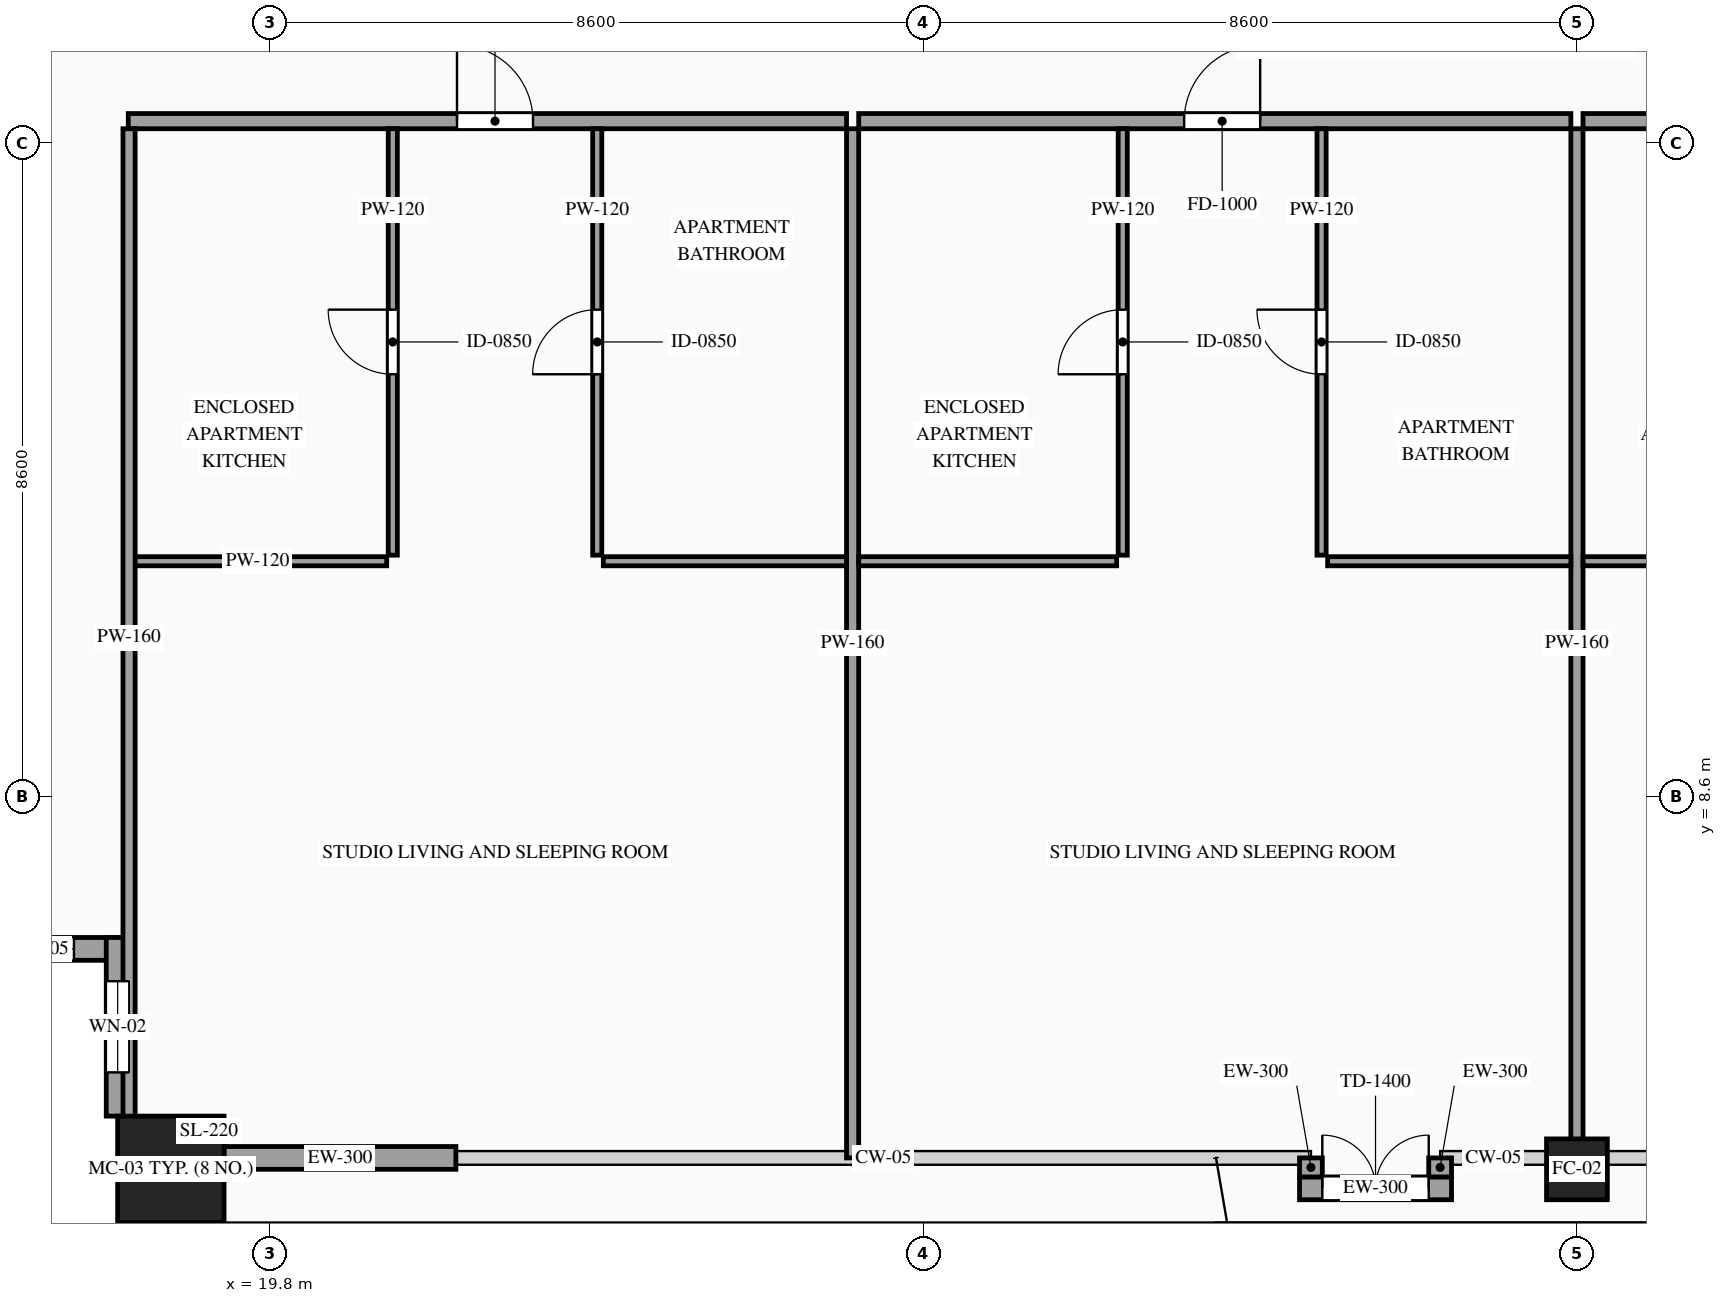
"""IFC4 building model, lengths in metres.
Left out: names, types, materials, properties, quantities, classifications, styles, units other than length and angle.
Written with IfcOpenShell. Run it as: python <this file> out.ifc"""

import sys

from ifc_helpers import new_model, si_unit, direction, frame, frame_2d, origin, origin_2d, place, context, subcontext, project, spatial, rectangle, hollow_rectangle, extrude, source, transform, mapped, element, fill, save


model = new_model("IFC4")
c1 = context("Model", 3, precision=1e-05, world=origin(), true_north=direction((0.0, 1.0)))
c2 = subcontext(c1, "Body", "Model", "MODEL_VIEW")
j1 = project(units=[si_unit("LENGTHUNIT", "METRE"), si_unit("PLANEANGLEUNIT", "RADIAN")], contexts=[c1])
p1 = place(None, origin())
s1 = spatial("IfcSite", under=j1, at=p1, CompositionType="ELEMENT")
p2 = place(p1, origin())
s2 = spatial("IfcBuilding", under=s1, at=p2, CompositionType="ELEMENT")
p3 = place(p2, frame((0.0, 0.0, 184.5)))
s3 = spatial("IfcBuildingStorey", under=s2, at=p3, CompositionType="ELEMENT", Elevation=184.5)
m1 = source(origin(), c2, "Body", "SweptSolid", [
    extrude(hollow_rectangle(XDim=1.4, YDim=1.4, WallThickness=0.06, at=origin_2d()), origin(), (0.0, 0.0, 1.0), 3.5),
])
p4 = place(p3, frame((18.5, 3.7, 0.0), z_axis=(0.0, 0.0, 1.0), x_axis=(1.0, 0.0, 0.0)))
e1 = element("IfcColumn", 1, at=p4, inside=s3, PredefinedType="COLUMN", context=c2, shape_type="MappedRepresentation", body=[
    mapped(m1, transform((0.0, 0.0, 0.0), scale=1.0)),
])
m2 = source(origin(), c2, "Body", "SweptSolid", [
    extrude(hollow_rectangle(XDim=0.8, YDim=0.8, WallThickness=0.036, at=origin_2d()), origin(), (0.0, 0.0, 1.0), 3.5),
])
p5 = place(p3, frame((37.0, 3.7, 0.0), z_axis=(0.0, 0.0, 1.0), x_axis=(1.0, 0.0, 0.0)))
e2 = element("IfcColumn", 2, at=p5, inside=s3, PredefinedType="COLUMN", context=c2, shape_type="MappedRepresentation", body=[
    mapped(m2, transform((0.0, 0.0, 0.0), scale=1.0)),
])
p6 = place(p3, frame((15.6, 6.6, 0.0), z_axis=(0.0, 0.0, 1.0), x_axis=(1.0, 0.0, 0.0)))
e3 = element("IfcWall", 3, at=p6, inside=s3, PredefinedType="SOLIDWALL", context=c2, shape_type="SweptSolid", body=[
    extrude(rectangle(XDim=2.35, YDim=0.3, at=frame_2d((1.175, 0.0))), origin(), (0.0, 0.0, 1.0), 3.28),
])
p7 = place(p6, frame((0.725, 0.0, 0.85)))
e4 = element("IfcOpeningElement", 4, at=p7, cuts=e3, PredefinedType="OPENING", context=c2, shape_type="SweptSolid", body=[
    extrude(rectangle(XDim=0.9, YDim=1.5, at=frame_2d((0.45, 0.75))), frame((0.0, 0.165, 0.0), z_axis=(0.0, -1.0, 0.0), x_axis=(1.0, 0.0, 0.0)), (0.0, 0.0, 1.0), 0.33),
])
p8 = place(p3, frame((17.8, 6.75, 0.0), z_axis=(0.0, 0.0, 1.0), x_axis=(0.0, -1.0, 0.0)))
e5 = element("IfcWall", 5, at=p8, inside=s3, PredefinedType="SOLIDWALL", context=c2, shape_type="SweptSolid", body=[
    extrude(rectangle(XDim=2.35, YDim=0.3, at=frame_2d((1.175, 0.0))), origin(), (0.0, 0.0, 1.0), 3.28),
])
p9 = place(p8, frame((0.575, 0.0, 0.85)))
e6 = element("IfcOpeningElement", 6, at=p9, cuts=e5, PredefinedType="OPENING", context=c2, shape_type="SweptSolid", body=[
    extrude(rectangle(XDim=1.2, YDim=2.1, at=frame_2d((0.6, 1.05))), frame((0.0, 0.165, 0.0), z_axis=(0.0, -1.0, 0.0), x_axis=(1.0, 0.0, 0.0)), (0.0, 0.0, 1.0), 0.33),
])
m3 = source(origin(), c2, "Body", "SweptSolid", [
    extrude(rectangle(XDim=3.05, YDim=0.3, at=frame_2d((1.525, 0.0))), origin(), (0.0, 0.0, 1.0), 2.835),
])
p10 = place(p3, frame((19.2, 3.85, 0.0), z_axis=(0.0, 0.0, 1.0), x_axis=(1.0, 0.0, 0.0)))
e7 = element("IfcWall", 7, at=p10, inside=s3, PredefinedType="SOLIDWALL", context=c2, shape_type="MappedRepresentation", body=[
    mapped(m3, transform((0.0, 0.0, 0.0), scale=1.0)),
])
p11 = place(p3, frame((33.35, 3.45, 0.0), z_axis=(0.0, 0.0, 1.0), x_axis=(1.0, 0.0, 0.0)))
e8 = element("IfcWall", 8, at=p11, inside=s3, PredefinedType="SOLIDWALL", context=c2, shape_type="SweptSolid", body=[
    extrude(rectangle(XDim=2.0, YDim=0.3, at=frame_2d((1.0, 0.0))), origin(), (0.0, 0.0, 1.0), 2.835),
])
p12 = place(p11, frame((0.3, 0.0, 0.0)))
e9 = element("IfcOpeningElement", 9, at=p12, cuts=e8, PredefinedType="OPENING", context=c2, shape_type="SweptSolid", body=[
    extrude(rectangle(XDim=1.4, YDim=2.3, at=frame_2d((0.7, 1.15))), frame((0.0, 0.165, 0.0), z_axis=(0.0, -1.0, 0.0), x_axis=(1.0, 0.0, 0.0)), (0.0, 0.0, 1.0), 0.33),
])
m4 = source(origin(), c2, "Body", "SweptSolid", [
    extrude(rectangle(XDim=0.25, YDim=0.3, at=frame_2d((0.125, 0.0))), origin(), (0.0, 0.0, 1.0), 3.28),
])
for number, where, z_axis, x_axis in (
    (10, (33.5, 3.85, 0.0), (0.0, 0.0, 1.0), (0.0, -1.0, 0.0)),
    (11, (35.2, 3.6, 0.0), (0.0, 0.0, 1.0), (0.0, 1.0, 0.0)),
):
    element("IfcWall", number, at=place(p3, frame(where, z_axis=z_axis, x_axis=x_axis)), inside=s3, PredefinedType="SOLIDWALL", context=c2, shape_type="MappedRepresentation", body=[
        mapped(m4, transform((0.0, 0.0, 0.0), scale=1.0)),
    ])
p13 = place(p3, frame((17.94, 17.49, 0.0), z_axis=(0.0, 0.0, 1.0), x_axis=(1.0, 0.0, 0.0)))
e12 = element("IfcWall", 12, at=p13, inside=s3, PredefinedType="PARTITIONING", context=c2, shape_type="SweptSolid", body=[
    extrude(rectangle(XDim=9.45, YDim=0.2, at=frame_2d((4.725, 0.0))), origin(), (0.0, 0.0, 1.0), 3.28),
])
p14 = place(p13, frame((4.325, 0.0, 0.0)))
e13 = element("IfcOpeningElement", 13, at=p14, cuts=e12, PredefinedType="OPENING", context=c2, shape_type="SweptSolid", body=[
    extrude(rectangle(XDim=1.0, YDim=2.2, at=frame_2d((0.5, 1.1))), frame((0.0, 0.115, 0.0), z_axis=(0.0, -1.0, 0.0), x_axis=(1.0, 0.0, 0.0)), (0.0, 0.0, 1.0), 0.23),
])
m5 = source(origin(), c2, "Body", "SweptSolid", [
    extrude(rectangle(XDim=13.54, YDim=0.16, at=frame_2d((6.77, 0.0))), origin(), (0.0, 0.0, 1.0), 3.28),
])
p15 = place(p3, frame((27.47, 3.85, 0.0), z_axis=(0.0, 0.0, 1.0), x_axis=(0.0, 1.0, 0.0)))
e14 = element("IfcWall", 14, at=p15, inside=s3, PredefinedType="PARTITIONING", context=c2, shape_type="MappedRepresentation", body=[
    mapped(m5, transform((0.0, 0.0, 0.0), scale=1.0)),
])
m6 = source(origin(), c2, "Body", "SweptSolid", [
    extrude(rectangle(XDim=3.4, YDim=0.12, at=frame_2d((1.7, 0.0))), origin(), (0.0, 0.0, 1.0), 3.28),
])
p16 = place(p3, frame((17.94, 11.7, 0.0), z_axis=(0.0, 0.0, 1.0), x_axis=(1.0, 0.0, 0.0)))
e15 = element("IfcWall", 15, at=p16, inside=s3, PredefinedType="PARTITIONING", context=c2, shape_type="MappedRepresentation", body=[
    mapped(m6, transform((0.0, 0.0, 0.0), scale=1.0)),
])
p17 = place(p3, frame((21.42, 11.78, 0.0), z_axis=(0.0, 0.0, 1.0), x_axis=(0.0, 1.0, 0.0)))
e16 = element("IfcWall", 16, at=p17, inside=s3, PredefinedType="PARTITIONING", context=c2, shape_type="SweptSolid", body=[
    extrude(rectangle(XDim=5.61, YDim=0.12, at=frame_2d((2.805, 0.0))), origin(), (0.0, 0.0, 1.0), 3.28),
])
p18 = place(p17, frame((2.38, 0.0, 0.0)))
e17 = element("IfcOpeningElement", 17, at=p18, cuts=e16, PredefinedType="OPENING", context=c2, shape_type="SweptSolid", body=[
    extrude(rectangle(XDim=0.85, YDim=2.1, at=frame_2d((0.425, 1.05))), frame((0.0, 0.075, 0.0), z_axis=(0.0, -1.0, 0.0), x_axis=(1.0, 0.0, 0.0)), (0.0, 0.0, 1.0), 0.15),
])
m7 = source(origin(), c2, "Body", "SweptSolid", [
    extrude(rectangle(XDim=3.2, YDim=0.12, at=frame_2d((1.6, 0.0))), origin(), (0.0, 0.0, 1.0), 2.875),
])
p19 = place(p3, frame((24.19, 11.7, 0.0), z_axis=(0.0, 0.0, 1.0), x_axis=(1.0, 0.0, 0.0)))
e18 = element("IfcWall", 18, at=p19, inside=s3, PredefinedType="PARTITIONING", context=c2, shape_type="MappedRepresentation", body=[
    mapped(m7, transform((0.0, 0.0, 0.0), scale=1.0)),
])
p20 = place(p3, frame((24.11, 11.78, 0.0), z_axis=(0.0, 0.0, 1.0), x_axis=(0.0, 1.0, 0.0)))
e19 = element("IfcWall", 19, at=p20, inside=s3, PredefinedType="PARTITIONING", context=c2, shape_type="SweptSolid", body=[
    extrude(rectangle(XDim=5.61, YDim=0.12, at=frame_2d((2.805, 0.0))), origin(), (0.0, 0.0, 1.0), 3.28),
])
p21 = place(p20, frame((2.38, 0.0, 0.0)))
e20 = element("IfcOpeningElement", 20, at=p21, cuts=e19, PredefinedType="OPENING", context=c2, shape_type="SweptSolid", body=[
    extrude(rectangle(XDim=0.85, YDim=2.1, at=frame_2d((0.425, 1.05))), frame((0.0, 0.075, 0.0), z_axis=(0.0, -1.0, 0.0), x_axis=(1.0, 0.0, 0.0)), (0.0, 0.0, 1.0), 0.15),
])
p22 = place(p3, frame((27.55, 17.49, 0.0), z_axis=(0.0, 0.0, 1.0), x_axis=(1.0, 0.0, 0.0)))
e21 = element("IfcWall", 21, at=p22, inside=s3, PredefinedType="PARTITIONING", context=c2, shape_type="SweptSolid", body=[
    extrude(rectangle(XDim=9.37, YDim=0.2, at=frame_2d((4.685, 0.0))), origin(), (0.0, 0.0, 1.0), 3.28),
])
p23 = place(p22, frame((4.282, 0.0, 0.0)))
e22 = element("IfcOpeningElement", 22, at=p23, cuts=e21, PredefinedType="OPENING", context=c2, shape_type="SweptSolid", body=[
    extrude(rectangle(XDim=1.0, YDim=2.2, at=frame_2d((0.5, 1.1))), frame((0.0, 0.115, 0.0), z_axis=(0.0, -1.0, 0.0), x_axis=(1.0, 0.0, 0.0)), (0.0, 0.0, 1.0), 0.23),
])
m8 = source(origin(), c2, "Body", "SweptSolid", [
    extrude(rectangle(XDim=13.54, YDim=0.16, at=frame_2d((6.77, 0.0))), origin(), (0.0, 0.0, 1.0), 2.687),
])
p24 = place(p3, frame((37.0, 3.85, 0.0), z_axis=(0.0, 0.0, 1.0), x_axis=(0.0, 1.0, 0.0)))
e23 = element("IfcWall", 23, at=p24, inside=s3, PredefinedType="PARTITIONING", context=c2, shape_type="MappedRepresentation", body=[
    mapped(m8, transform((0.0, 0.0, 0.0), scale=1.0)),
])
m9 = source(origin(), c2, "Body", "SweptSolid", [
    extrude(rectangle(XDim=3.394, YDim=0.12, at=frame_2d((1.697, 0.0))), origin(), (0.0, 0.0, 1.0), 2.875),
])
p25 = place(p3, frame((27.55, 11.7, 0.0), z_axis=(0.0, 0.0, 1.0), x_axis=(1.0, 0.0, 0.0)))
e24 = element("IfcWall", 24, at=p25, inside=s3, PredefinedType="PARTITIONING", context=c2, shape_type="MappedRepresentation", body=[
    mapped(m9, transform((0.0, 0.0, 0.0), scale=1.0)),
])
p26 = place(p3, frame((31.024, 11.78, 0.0), z_axis=(0.0, 0.0, 1.0), x_axis=(0.0, 1.0, 0.0)))
e25 = element("IfcWall", 25, at=p26, inside=s3, PredefinedType="PARTITIONING", context=c2, shape_type="SweptSolid", body=[
    extrude(rectangle(XDim=5.61, YDim=0.12, at=frame_2d((2.805, 0.0))), origin(), (0.0, 0.0, 1.0), 3.28),
])
p27 = place(p26, frame((2.38, 0.0, 0.0)))
e26 = element("IfcOpeningElement", 26, at=p27, cuts=e25, PredefinedType="OPENING", context=c2, shape_type="SweptSolid", body=[
    extrude(rectangle(XDim=0.85, YDim=2.1, at=frame_2d((0.425, 1.05))), frame((0.0, 0.075, 0.0), z_axis=(0.0, -1.0, 0.0), x_axis=(1.0, 0.0, 0.0)), (0.0, 0.0, 1.0), 0.15),
])
p28 = place(p3, frame((33.72, 11.7, 0.0), z_axis=(0.0, 0.0, 1.0), x_axis=(1.0, 0.0, 0.0)))
e27 = element("IfcWall", 27, at=p28, inside=s3, PredefinedType="PARTITIONING", context=c2, shape_type="MappedRepresentation", body=[
    mapped(m7, transform((0.0, 0.0, 0.0), scale=1.0)),
])
p29 = place(p3, frame((33.64, 11.78, 0.0), z_axis=(0.0, 0.0, 1.0), x_axis=(0.0, 1.0, 0.0)))
e28 = element("IfcWall", 28, at=p29, inside=s3, PredefinedType="PARTITIONING", context=c2, shape_type="SweptSolid", body=[
    extrude(rectangle(XDim=5.61, YDim=0.12, at=frame_2d((2.805, 0.0))), origin(), (0.0, 0.0, 1.0), 3.28),
])
p30 = place(p29, frame((2.38, 0.0, 0.0)))
e29 = element("IfcOpeningElement", 29, at=p30, cuts=e28, PredefinedType="OPENING", context=c2, shape_type="SweptSolid", body=[
    extrude(rectangle(XDim=0.85, YDim=2.1, at=frame_2d((0.425, 1.05))), frame((0.0, 0.075, 0.0), z_axis=(0.0, -1.0, 0.0), x_axis=(1.0, 0.0, 0.0)), (0.0, 0.0, 1.0), 0.15),
])
p31 = place(p3, frame((37.08, 17.49, 0.0), z_axis=(0.0, 0.0, 1.0), x_axis=(1.0, 0.0, 0.0)))
e30 = element("IfcWall", 30, at=p31, inside=s3, PredefinedType="PARTITIONING", context=c2, shape_type="SweptSolid", body=[
    extrude(rectangle(XDim=9.37, YDim=0.2, at=frame_2d((4.685, 0.0))), origin(), (0.0, 0.0, 1.0), 3.28),
])
p32 = place(p31, frame((4.282, 0.0, 0.0)))
e31 = element("IfcOpeningElement", 31, at=p32, cuts=e30, PredefinedType="OPENING", context=c2, shape_type="SweptSolid", body=[
    extrude(rectangle(XDim=1.0, YDim=2.2, at=frame_2d((0.5, 1.1))), frame((0.0, 0.115, 0.0), z_axis=(0.0, -1.0, 0.0), x_axis=(1.0, 0.0, 0.0)), (0.0, 0.0, 1.0), 0.23),
])
p33 = place(p3, frame((37.08, 11.7, 0.0), z_axis=(0.0, 0.0, 1.0), x_axis=(1.0, 0.0, 0.0)))
e32 = element("IfcWall", 32, at=p33, inside=s3, PredefinedType="PARTITIONING", context=c2, shape_type="MappedRepresentation", body=[
    mapped(m9, transform((0.0, 0.0, 0.0), scale=1.0)),
])
m10 = source(origin(), c2, "Body", "SweptSolid", [
    extrude(rectangle(XDim=13.39, YDim=0.16, at=frame_2d((6.695, 0.0))), origin(), (0.0, 0.0, 1.0), 3.28),
])
p34 = place(p3, frame((17.95, 4.0, 0.0), z_axis=(0.0, 0.0, 1.0), x_axis=(0.0, 1.0, 0.0)))
e33 = element("IfcWall", 33, at=p34, inside=s3, PredefinedType="PARTITIONING", context=c2, shape_type="MappedRepresentation", body=[
    mapped(m10, transform((0.0, 0.0, 0.0), scale=1.0)),
])
m11 = source(origin(), c2, "Body", "SweptSolid", [
    extrude(rectangle(XDim=0.9, YDim=1.5, at=frame_2d((0.45, 0.75))), frame((0.0, 0.03, 0.0), z_axis=(0.0, -1.0, 0.0), x_axis=(1.0, 0.0, 0.0)), (0.0, 0.0, 1.0), 0.06),
])
p35 = place(p7, origin())
e34 = element("IfcWindow", 34, at=p35, inside=s3, PartitioningType="SINGLE_PANEL", PredefinedType="WINDOW", context=c2, shape_type="MappedRepresentation", body=[
    mapped(m11, transform((0.0, 0.0, 0.0), scale=1.0)),
])
fill(e4, e34)
m12 = source(origin(), c2, "Body", "SweptSolid", [
    extrude(rectangle(XDim=1.2, YDim=2.1, at=frame_2d((0.6, 1.05))), frame((0.0, 0.03, 0.0), z_axis=(0.0, -1.0, 0.0), x_axis=(1.0, 0.0, 0.0)), (0.0, 0.0, 1.0), 0.06),
])
p36 = place(p9, origin())
e35 = element("IfcWindow", 35, at=p36, inside=s3, PartitioningType="SINGLE_PANEL", PredefinedType="WINDOW", context=c2, shape_type="MappedRepresentation", body=[
    mapped(m12, transform((0.0, 0.0, 0.0), scale=1.0)),
])
fill(e6, e35)
m13 = source(origin(), c2, "Body", "SweptSolid", [
    extrude(rectangle(XDim=1.4, YDim=2.3, at=frame_2d((0.7, 1.15))), frame((0.0, 0.025, 0.0), z_axis=(0.0, -1.0, 0.0), x_axis=(1.0, 0.0, 0.0)), (0.0, 0.0, 1.0), 0.05),
])
p37 = place(p12, origin())
e36 = element("IfcDoor", 36, at=p37, inside=s3, OperationType="DOUBLE_DOOR_SINGLE_SWING", PredefinedType="DOOR", context=c2, shape_type="MappedRepresentation", body=[
    mapped(m13, transform((0.0, 0.0, 0.0), scale=1.0)),
])
fill(e9, e36)
m14 = source(origin(), c2, "Body", "SweptSolid", [
    extrude(rectangle(XDim=1.0, YDim=2.2, at=frame_2d((0.5, 1.1))), frame((0.0, 0.025, 0.0), z_axis=(0.0, -1.0, 0.0), x_axis=(1.0, 0.0, 0.0)), (0.0, 0.0, 1.0), 0.05),
])
p38 = place(p14, origin())
e37 = element("IfcDoor", 37, at=p38, inside=s3, OperationType="SINGLE_SWING_LEFT", PredefinedType="DOOR", context=c2, shape_type="MappedRepresentation", body=[
    mapped(m14, transform((0.0, 0.0, 0.0), scale=1.0)),
])
fill(e13, e37)
m15 = source(origin(), c2, "Body", "SweptSolid", [
    extrude(rectangle(XDim=0.85, YDim=2.1, at=frame_2d((0.425, 1.05))), frame((0.0, 0.025, 0.0), z_axis=(0.0, -1.0, 0.0), x_axis=(1.0, 0.0, 0.0)), (0.0, 0.0, 1.0), 0.05),
])
p39 = place(p18, origin())
e38 = element("IfcDoor", 38, at=p39, inside=s3, OperationType="SINGLE_SWING_RIGHT", PredefinedType="DOOR", context=c2, shape_type="MappedRepresentation", body=[
    mapped(m15, transform((0.0, 0.0, 0.0), scale=1.0)),
])
fill(e17, e38)
p40 = place(p21, origin())
e39 = element("IfcDoor", 39, at=p40, inside=s3, OperationType="SINGLE_SWING_LEFT", PredefinedType="DOOR", context=c2, shape_type="MappedRepresentation", body=[
    mapped(m15, transform((0.0, 0.0, 0.0), scale=1.0)),
])
fill(e20, e39)
p41 = place(p23, origin())
e40 = element("IfcDoor", 40, at=p41, inside=s3, OperationType="SINGLE_SWING_RIGHT", PredefinedType="DOOR", context=c2, shape_type="MappedRepresentation", body=[
    mapped(m14, transform((0.0, 0.0, 0.0), scale=1.0)),
])
fill(e22, e40)
p42 = place(p27, origin())
e41 = element("IfcDoor", 41, at=p42, inside=s3, OperationType="SINGLE_SWING_LEFT", PredefinedType="DOOR", context=c2, shape_type="MappedRepresentation", body=[
    mapped(m15, transform((0.0, 0.0, 0.0), scale=1.0)),
])
fill(e26, e41)
p43 = place(p30, origin())
e42 = element("IfcDoor", 42, at=p43, inside=s3, OperationType="SINGLE_SWING_RIGHT", PredefinedType="DOOR", context=c2, shape_type="MappedRepresentation", body=[
    mapped(m15, transform((0.0, 0.0, 0.0), scale=1.0)),
])
fill(e29, e42)
save(model, sys.argv[1])
